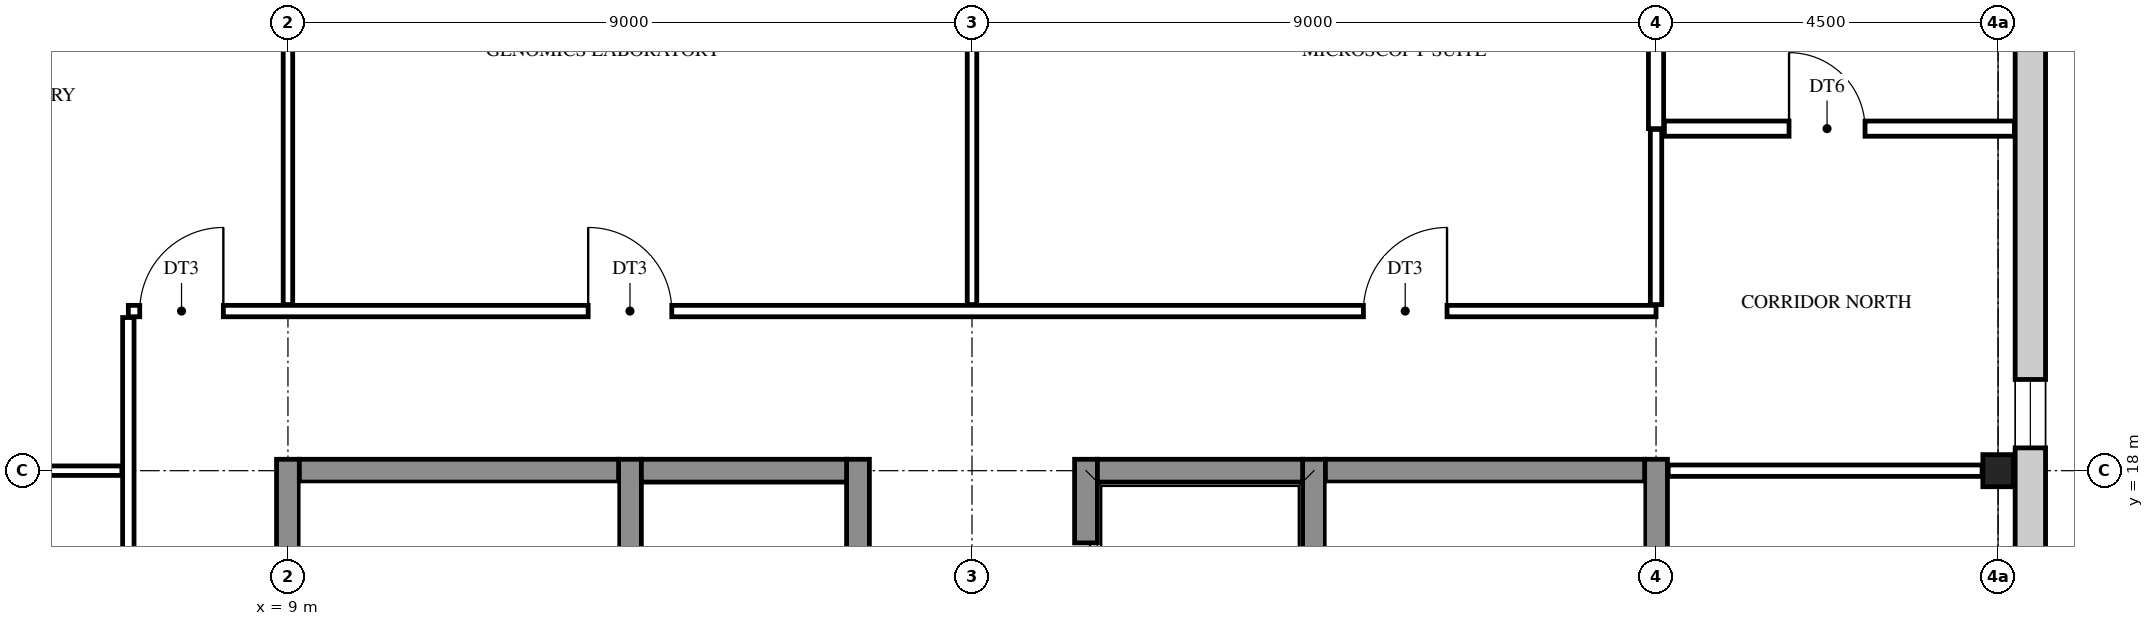
"""IFC4 building model, lengths in metres.
Left out: names, types, materials, properties, quantities, classifications, styles, units other than length and angle.
Written with IfcOpenShell. Run it as: python <this file> out.ifc"""

import sys

from ifc_helpers import new_model, si_unit, direction, frame, frame_2d, origin, origin_2d, place, context, subcontext, project, spatial, rectangle, i_section, extrude, element, fill, save


model = new_model("IFC4")
c1 = context("Model", 3, precision=1e-05, world=origin(), true_north=direction((0.0, 1.0)))
c2 = subcontext(c1, "Body", "Model", "MODEL_VIEW")
j1 = project(units=[si_unit("LENGTHUNIT", "METRE"), si_unit("PLANEANGLEUNIT", "RADIAN")], contexts=[c1])
p1 = place(None, origin())
s1 = spatial("IfcSite", under=j1, at=p1, CompositionType="ELEMENT")
p2 = place(p1, origin())
s2 = spatial("IfcBuilding", under=s1, at=p2, CompositionType="ELEMENT")
p3 = place(p2, frame((0.0, 0.0, 15.0)))
s3 = spatial("IfcBuildingStorey", under=s2, at=p3, CompositionType="ELEMENT", Elevation=15.0)
p4 = place(p3, frame((31.5, 18.0, 0.0), z_axis=(0.0, 0.0, 1.0), x_axis=(1.0, 0.0, 0.0)))
e1 = element("IfcColumn", 1, at=p4, inside=s3, PredefinedType="COLUMN", context=c2, shape_type="SweptSolid", body=[
    extrude(i_section(OverallWidth=0.4, OverallDepth=0.422, WebThickness=0.028, FlangeThickness=0.036, at=origin_2d()), origin(), (0.0, 0.0, 1.0), 4.2),
])
for number, where, z_axis, x_axis in (
    (2, (9.0, 8.85, 0.0), (0.0, 0.0, 1.0), (0.0, 1.0, 0.0)),
    (3, (13.5, 8.85, 0.0), (0.0, 0.0, 1.0), (0.0, 1.0, 0.0)),
):
    element("IfcWall", number, at=place(p3, frame(where, z_axis=z_axis, x_axis=x_axis)), inside=s3, PredefinedType="SHEAR", context=c2, shape_type="SweptSolid", body=[
        extrude(rectangle(XDim=9.3, YDim=0.3, at=frame_2d((4.65, 0.0))), origin(), (0.0, 0.0, 1.0), 4.2),
    ])
p5 = place(p3, frame((16.5, 8.85, 0.0), z_axis=(0.0, 0.0, 1.0), x_axis=(0.0, 1.0, 0.0)))
e4 = element("IfcWall", 4, at=p5, inside=s3, PredefinedType="SHEAR", context=c2, shape_type="SweptSolid", body=[
    extrude(rectangle(XDim=9.3, YDim=0.3, at=frame_2d((4.65, 0.0))), origin(), (0.0, 0.0, 1.0), 4.2),
])
p6 = place(p5, frame((1.1, 0.0, 0.0)))
e5 = element("IfcOpeningElement", 5, at=p6, cuts=e4, PredefinedType="OPENING", context=c2, shape_type="SweptSolid", body=[
    extrude(rectangle(XDim=1.1, YDim=2.1, at=frame_2d((0.55, 1.05))), frame((0.0, 0.16, 0.0), z_axis=(0.0, -1.0, 0.0), x_axis=(1.0, 0.0, 0.0)), (0.0, 0.0, 1.0), 0.32),
])
p7 = place(p5, frame((4.1, 0.0, 0.0)))
e6 = element("IfcOpeningElement", 6, at=p7, cuts=e4, PredefinedType="OPENING", context=c2, shape_type="SweptSolid", body=[
    extrude(rectangle(XDim=1.1, YDim=2.1, at=frame_2d((0.55, 1.05))), frame((0.0, 0.16, 0.0), z_axis=(0.0, -1.0, 0.0), x_axis=(1.0, 0.0, 0.0)), (0.0, 0.0, 1.0), 0.32),
])
p8 = place(p3, frame((19.5, 8.85, 0.0), z_axis=(0.0, 0.0, 1.0), x_axis=(0.0, 1.0, 0.0)))
e7 = element("IfcWall", 7, at=p8, inside=s3, PredefinedType="SHEAR", context=c2, shape_type="SweptSolid", body=[
    extrude(rectangle(XDim=9.3, YDim=0.3, at=frame_2d((4.65, 0.0))), origin(), (0.0, 0.0, 1.0), 4.2),
])
p9 = place(p8, frame((3.95, 0.0, 0.0)))
e8 = element("IfcOpeningElement", 8, at=p9, cuts=e7, PredefinedType="OPENING", context=c2, shape_type="SweptSolid", body=[
    extrude(rectangle(XDim=1.4, YDim=2.1, at=frame_2d((0.7, 1.05))), frame((0.0, 0.16, 0.0), z_axis=(0.0, -1.0, 0.0), x_axis=(1.0, 0.0, 0.0)), (0.0, 0.0, 1.0), 0.32),
])
p10 = place(p8, frame((7.1, 0.0, 0.0)))
e9 = element("IfcOpeningElement", 9, at=p10, cuts=e7, PredefinedType="OPENING", context=c2, shape_type="SweptSolid", body=[
    extrude(rectangle(XDim=1.1, YDim=2.1, at=frame_2d((0.55, 1.05))), frame((0.0, 0.16, 0.0), z_axis=(0.0, -1.0, 0.0), x_axis=(1.0, 0.0, 0.0)), (0.0, 0.0, 1.0), 0.32),
])
for number, where, z_axis, x_axis in (
    (10, (22.5, 8.85, 0.0), (0.0, 0.0, 1.0), (0.0, 1.0, 0.0)),
    (11, (27.0, 8.85, 0.0), (0.0, 0.0, 1.0), (0.0, 1.0, 0.0)),
):
    element("IfcWall", number, at=place(p3, frame(where, z_axis=z_axis, x_axis=x_axis)), inside=s3, PredefinedType="SHEAR", context=c2, shape_type="SweptSolid", body=[
        extrude(rectangle(XDim=9.3, YDim=0.3, at=frame_2d((4.65, 0.0))), origin(), (0.0, 0.0, 1.0), 4.2),
    ])
p11 = place(p3, frame((9.15, 18.0, 0.0), z_axis=(0.0, 0.0, 1.0), x_axis=(1.0, 0.0, 0.0)))
e12 = element("IfcWall", 12, at=p11, inside=s3, PredefinedType="SHEAR", context=c2, shape_type="SweptSolid", body=[
    extrude(rectangle(XDim=4.2, YDim=0.3, at=frame_2d((2.1, 0.0))), origin(), (0.0, 0.0, 1.0), 4.2),
])
for number, where, z_axis, x_axis in (
    (13, (13.65, 18.0, 0.0), (0.0, 0.0, 1.0), (1.0, 0.0, 0.0)),
    (14, (19.65, 18.0, 0.0), (0.0, 0.0, 1.0), (1.0, 0.0, 0.0)),
):
    element("IfcWall", number, at=place(p3, frame(where, z_axis=z_axis, x_axis=x_axis)), inside=s3, PredefinedType="SHEAR", context=c2, shape_type="SweptSolid", body=[
        extrude(rectangle(XDim=2.7, YDim=0.3, at=frame_2d((1.35, 0.0))), origin(), (0.0, 0.0, 1.0), 4.2),
    ])
p12 = place(p3, frame((22.65, 18.0, 0.0), z_axis=(0.0, 0.0, 1.0), x_axis=(1.0, 0.0, 0.0)))
e15 = element("IfcWall", 15, at=p12, inside=s3, PredefinedType="SHEAR", context=c2, shape_type="SweptSolid", body=[
    extrude(rectangle(XDim=4.2, YDim=0.3, at=frame_2d((2.1, 0.0))), origin(), (0.0, 0.0, 1.0), 4.2),
])
p13 = place(p3, frame((31.925, 27.225, 0.0), z_axis=(0.0, 0.0, 1.0), x_axis=(0.0, -1.0, 0.0)))
e16 = element("IfcWall", 16, at=p13, inside=s3, PredefinedType="STANDARD", context=c2, shape_type="SweptSolid", body=[
    extrude(rectangle(XDim=27.45, YDim=0.4, at=frame_2d((13.725, 0.0))), origin(), (0.0, 0.0, 1.0), 4.2),
])
p14 = place(p13, frame((26.025, 0.0, 0.9)))
e17 = element("IfcOpeningElement", 17, at=p14, cuts=e16, PredefinedType="OPENING", context=c2, shape_type="SweptSolid", body=[
    extrude(rectangle(XDim=0.9, YDim=2.0, at=frame_2d((0.45, 1.0))), frame((0.0, 0.21, 0.0), z_axis=(0.0, -1.0, 0.0), x_axis=(1.0, 0.0, 0.0)), (0.0, 0.0, 1.0), 0.42),
])
p15 = place(p13, frame((18.525, 0.0, 0.9)))
e18 = element("IfcOpeningElement", 18, at=p15, cuts=e16, PredefinedType="OPENING", context=c2, shape_type="SweptSolid", body=[
    extrude(rectangle(XDim=0.9, YDim=2.0, at=frame_2d((0.45, 1.0))), frame((0.0, 0.21, 0.0), z_axis=(0.0, -1.0, 0.0), x_axis=(1.0, 0.0, 0.0)), (0.0, 0.0, 1.0), 0.42),
])
p16 = place(p13, frame((15.675, 0.0, 1.6)))
e19 = element("IfcOpeningElement", 19, at=p16, cuts=e16, PredefinedType="OPENING", context=c2, shape_type="SweptSolid", body=[
    extrude(rectangle(XDim=0.6, YDim=0.9, at=frame_2d((0.3, 0.45))), frame((0.0, 0.21, 0.0), z_axis=(0.0, -1.0, 0.0), x_axis=(1.0, 0.0, 0.0)), (0.0, 0.0, 1.0), 0.42),
])
p17 = place(p13, frame((11.175, 0.0, 1.6)))
e20 = element("IfcOpeningElement", 20, at=p17, cuts=e16, PredefinedType="OPENING", context=c2, shape_type="SweptSolid", body=[
    extrude(rectangle(XDim=0.6, YDim=0.9, at=frame_2d((0.3, 0.45))), frame((0.0, 0.21, 0.0), z_axis=(0.0, -1.0, 0.0), x_axis=(1.0, 0.0, 0.0)), (0.0, 0.0, 1.0), 0.42),
])
p18 = place(p13, frame((8.025, 0.0, 0.9)))
e21 = element("IfcOpeningElement", 21, at=p18, cuts=e16, PredefinedType="OPENING", context=c2, shape_type="SweptSolid", body=[
    extrude(rectangle(XDim=0.9, YDim=2.0, at=frame_2d((0.45, 1.0))), frame((0.0, 0.21, 0.0), z_axis=(0.0, -1.0, 0.0), x_axis=(1.0, 0.0, 0.0)), (0.0, 0.0, 1.0), 0.42),
])
p19 = place(p13, frame((0.525, 0.0, 0.9)))
e22 = element("IfcOpeningElement", 22, at=p19, cuts=e16, PredefinedType="OPENING", context=c2, shape_type="SweptSolid", body=[
    extrude(rectangle(XDim=0.9, YDim=2.0, at=frame_2d((0.45, 1.0))), frame((0.0, 0.21, 0.0), z_axis=(0.0, -1.0, 0.0), x_axis=(1.0, 0.0, 0.0)), (0.0, 0.0, 1.0), 0.42),
])
p20 = place(p3, frame((6.9, 6.985, 0.0), z_axis=(0.0, 0.0, 1.0), x_axis=(0.0, 1.0, 0.0)))
e23 = element("IfcWall", 23, at=p20, inside=s3, PredefinedType="PARTITIONING", context=c2, shape_type="SweptSolid", body=[
    extrude(rectangle(XDim=13.03, YDim=0.15, at=frame_2d((6.515, 0.0))), origin(), (0.0, 0.0, 1.0), 3.537),
])
p21 = place(p20, frame((3.765, 0.0, 0.0)))
e24 = element("IfcOpeningElement", 24, at=p21, cuts=e23, PredefinedType="OPENING", context=c2, shape_type="SweptSolid", body=[
    extrude(rectangle(XDim=1.0, YDim=2.1, at=frame_2d((0.5, 1.05))), frame((0.0, 0.085, 0.0), z_axis=(0.0, -1.0, 0.0), x_axis=(1.0, 0.0, 0.0)), (0.0, 0.0, 1.0), 0.17),
])
p22 = place(p20, frame((8.265, 0.0, 0.0)))
e25 = element("IfcOpeningElement", 25, at=p22, cuts=e23, PredefinedType="OPENING", context=c2, shape_type="SweptSolid", body=[
    extrude(rectangle(XDim=1.0, YDim=2.1, at=frame_2d((0.5, 1.05))), frame((0.0, 0.085, 0.0), z_axis=(0.0, -1.0, 0.0), x_axis=(1.0, 0.0, 0.0)), (0.0, 0.0, 1.0), 0.17),
])
for number, where, z_axis, x_axis in (
    (26, (9.0, 20.185, 0.0), (0.0, 0.0, 1.0), (0.0, 1.0, 0.0)),
    (27, (18.0, 20.185, 0.0), (0.0, 0.0, 1.0), (0.0, 1.0, 0.0)),
):
    element("IfcWall", number, at=place(p3, frame(where, z_axis=z_axis, x_axis=x_axis)), inside=s3, PredefinedType="PARTITIONING", context=c2, shape_type="SweptSolid", body=[
        extrude(rectangle(XDim=6.594, YDim=0.125, at=frame_2d((3.297, 0.0))), origin(), (0.0, 0.0, 1.0), 3.537),
    ])
p23 = place(p3, frame((27.0, 20.185, 0.0), z_axis=(0.0, 0.0, 1.0), x_axis=(0.0, 1.0, 0.0)))
e28 = element("IfcWall", 28, at=p23, inside=s3, PredefinedType="PARTITIONING", context=c2, shape_type="SweptSolid", body=[
    extrude(rectangle(XDim=2.305, YDim=0.15, at=frame_2d((1.152, 0.0))), origin(), (0.0, 0.0, 1.0), 3.537),
])
p24 = place(p3, frame((27.0, 22.5, 0.0), z_axis=(0.0, 0.0, 1.0), x_axis=(0.0, 1.0, 0.0)))
e29 = element("IfcWall", 29, at=p24, inside=s3, PredefinedType="PARTITIONING", context=c2, shape_type="SweptSolid", body=[
    extrude(rectangle(XDim=4.279, YDim=0.2, at=frame_2d((2.14, 0.0))), origin(), (0.0, 0.0, 1.0), 3.537),
])
p25 = place(p3, frame((0.21, 18.0, 0.0), z_axis=(0.0, 0.0, 1.0), x_axis=(1.0, 0.0, 0.0)))
e30 = element("IfcWall", 30, at=p25, inside=s3, PredefinedType="PARTITIONING", context=c2, shape_type="SweptSolid", body=[
    extrude(rectangle(XDim=6.605, YDim=0.125, at=frame_2d((3.302, 0.0))), origin(), (0.0, 0.0, 1.0), 3.537),
])
p26 = place(p3, frame((27.16, 18.0, 0.0), z_axis=(0.0, 0.0, 1.0), x_axis=(1.0, 0.0, 0.0)))
e31 = element("IfcWall", 31, at=p26, inside=s3, PredefinedType="PARTITIONING", context=c2, shape_type="SweptSolid", body=[
    extrude(rectangle(XDim=4.13, YDim=0.15, at=frame_2d((2.065, 0.0))), origin(), (0.0, 0.0, 1.0), 3.537),
])
p27 = place(p3, frame((6.9, 20.1, 0.0), z_axis=(0.0, 0.0, 1.0), x_axis=(1.0, 0.0, 0.0)))
e32 = element("IfcWall", 32, at=p27, inside=s3, PredefinedType="PARTITIONING", context=c2, shape_type="SweptSolid", body=[
    extrude(rectangle(XDim=20.1, YDim=0.15, at=frame_2d((10.05, 0.0))), origin(), (0.0, 0.0, 1.0), 3.537),
])
p28 = place(p27, frame((0.15, 0.0, 0.0)))
e33 = element("IfcOpeningElement", 33, at=p28, cuts=e32, PredefinedType="OPENING", context=c2, shape_type="SweptSolid", body=[
    extrude(rectangle(XDim=1.1, YDim=2.1, at=frame_2d((0.55, 1.05))), frame((0.0, 0.085, 0.0), z_axis=(0.0, -1.0, 0.0), x_axis=(1.0, 0.0, 0.0)), (0.0, 0.0, 1.0), 0.17),
])
p29 = place(p27, frame((6.05, 0.0, 0.0)))
e34 = element("IfcOpeningElement", 34, at=p29, cuts=e32, PredefinedType="OPENING", context=c2, shape_type="SweptSolid", body=[
    extrude(rectangle(XDim=1.1, YDim=2.1, at=frame_2d((0.55, 1.05))), frame((0.0, 0.085, 0.0), z_axis=(0.0, -1.0, 0.0), x_axis=(1.0, 0.0, 0.0)), (0.0, 0.0, 1.0), 0.17),
])
p30 = place(p27, frame((16.25, 0.0, 0.0)))
e35 = element("IfcOpeningElement", 35, at=p30, cuts=e32, PredefinedType="OPENING", context=c2, shape_type="SweptSolid", body=[
    extrude(rectangle(XDim=1.1, YDim=2.1, at=frame_2d((0.55, 1.05))), frame((0.0, 0.085, 0.0), z_axis=(0.0, -1.0, 0.0), x_axis=(1.0, 0.0, 0.0)), (0.0, 0.0, 1.0), 0.17),
])
p31 = place(p3, frame((27.11, 22.5, 0.0), z_axis=(0.0, 0.0, 1.0), x_axis=(1.0, 0.0, 0.0)))
e36 = element("IfcWall", 36, at=p31, inside=s3, PredefinedType="PARTITIONING", context=c2, shape_type="SweptSolid", body=[
    extrude(rectangle(XDim=4.605, YDim=0.2, at=frame_2d((2.302, 0.0))), origin(), (0.0, 0.0, 1.0), 3.537),
])
p32 = place(p31, frame((1.64, 0.0, 0.0)))
e37 = element("IfcOpeningElement", 37, at=p32, cuts=e36, PredefinedType="OPENING", context=c2, shape_type="SweptSolid", body=[
    extrude(rectangle(XDim=1.0, YDim=2.1, at=frame_2d((0.5, 1.05))), frame((0.0, 0.11, 0.0), z_axis=(0.0, -1.0, 0.0), x_axis=(1.0, 0.0, 0.0)), (0.0, 0.0, 1.0), 0.22),
])
p33 = place(p18, origin())
e38 = element("IfcWindow", 38, at=p33, inside=s3, PartitioningType="SINGLE_PANEL", PredefinedType="WINDOW", context=c2, shape_type="SweptSolid", body=[
    extrude(rectangle(XDim=0.9, YDim=2.0, at=frame_2d((0.45, 1.0))), frame((0.0, 0.03, 0.0), z_axis=(0.0, -1.0, 0.0), x_axis=(1.0, 0.0, 0.0)), (0.0, 0.0, 1.0), 0.06),
])
fill(e21, e38)
p34 = place(p28, origin())
e39 = element("IfcDoor", 39, at=p34, inside=s3, OperationType="SINGLE_SWING_RIGHT", PredefinedType="DOOR", context=c2, shape_type="SweptSolid", body=[
    extrude(rectangle(XDim=1.1, YDim=2.1, at=frame_2d((0.55, 1.05))), frame((0.0, 0.025, 0.0), z_axis=(0.0, -1.0, 0.0), x_axis=(1.0, 0.0, 0.0)), (0.0, 0.0, 1.0), 0.05),
])
fill(e33, e39)
p35 = place(p29, origin())
e40 = element("IfcDoor", 40, at=p35, inside=s3, OperationType="SINGLE_SWING_LEFT", PredefinedType="DOOR", context=c2, shape_type="SweptSolid", body=[
    extrude(rectangle(XDim=1.1, YDim=2.1, at=frame_2d((0.55, 1.05))), frame((0.0, 0.025, 0.0), z_axis=(0.0, -1.0, 0.0), x_axis=(1.0, 0.0, 0.0)), (0.0, 0.0, 1.0), 0.05),
])
fill(e34, e40)
p36 = place(p30, origin())
e41 = element("IfcDoor", 41, at=p36, inside=s3, OperationType="SINGLE_SWING_RIGHT", PredefinedType="DOOR", context=c2, shape_type="SweptSolid", body=[
    extrude(rectangle(XDim=1.1, YDim=2.1, at=frame_2d((0.55, 1.05))), frame((0.0, 0.025, 0.0), z_axis=(0.0, -1.0, 0.0), x_axis=(1.0, 0.0, 0.0)), (0.0, 0.0, 1.0), 0.05),
])
fill(e35, e41)
p37 = place(p32, origin())
e42 = element("IfcDoor", 42, at=p37, inside=s3, OperationType="SINGLE_SWING_LEFT", PredefinedType="DOOR", context=c2, shape_type="SweptSolid", body=[
    extrude(rectangle(XDim=1.0, YDim=2.1, at=frame_2d((0.5, 1.05))), frame((0.0, 0.025, 0.0), z_axis=(0.0, -1.0, 0.0), x_axis=(1.0, 0.0, 0.0)), (0.0, 0.0, 1.0), 0.05),
])
fill(e37, e42)
p38 = place(p10, origin())
e43 = element("IfcDoor", 43, at=p38, inside=s3, OperationType="DOUBLE_DOOR_SLIDING", PredefinedType="DOOR", context=c2, shape_type="SweptSolid", body=[
    extrude(rectangle(XDim=1.1, YDim=2.1, at=frame_2d((0.55, 1.05))), frame((0.0, 0.025, 0.0), z_axis=(0.0, -1.0, 0.0), x_axis=(1.0, 0.0, 0.0)), (0.0, 0.0, 1.0), 0.05),
])
fill(e9, e43)
save(model, sys.argv[1])
